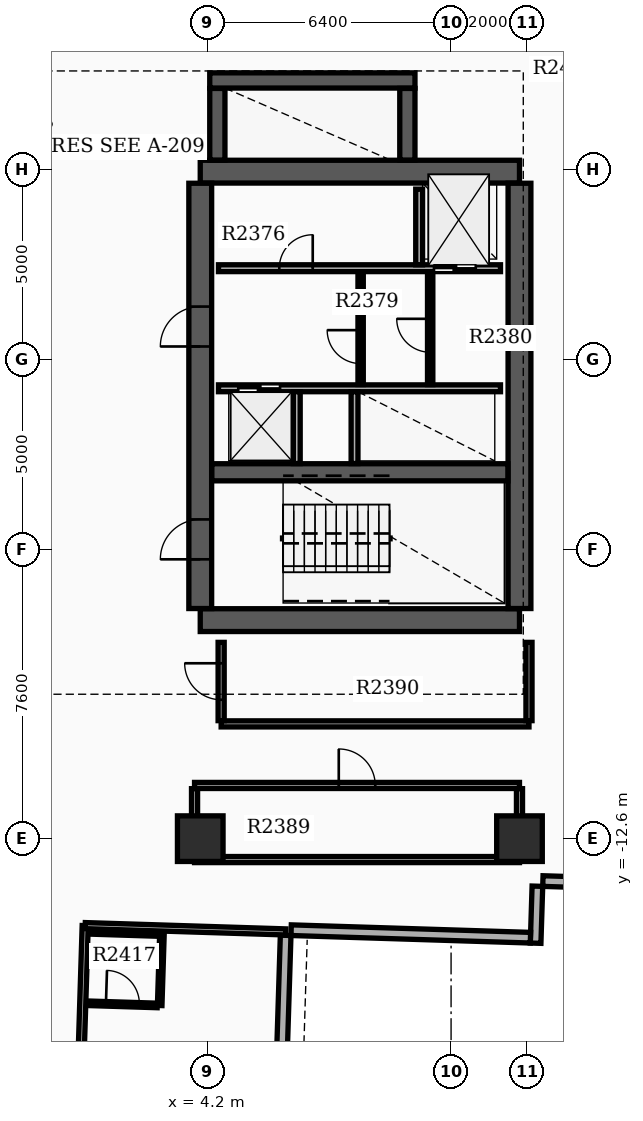
"""IFC4 building model, lengths in metres.
Left out: names, types, materials, properties, quantities, classifications, styles, units other than length and angle.
Written with IfcOpenShell. Run it as: python <this file> out.ifc"""

import sys

from ifc_helpers import new_model, si_unit, direction, frame, frame_2d, origin, origin_2d, place, context, subcontext, project, spatial, rectangle, extrude, element, fill, save


model = new_model("IFC4")
c1 = context("Model", 3, precision=1e-05, world=origin(), true_north=direction((0.0, 1.0)))
c2 = subcontext(c1, "Body", "Model", "MODEL_VIEW")
j1 = project(units=[si_unit("LENGTHUNIT", "METRE"), si_unit("PLANEANGLEUNIT", "RADIAN")], contexts=[c1])
p1 = place(None, origin())
s1 = spatial("IfcSite", under=j1, at=p1, CompositionType="ELEMENT")
p2 = place(p1, origin())
s2 = spatial("IfcBuilding", under=s1, at=p2, CompositionType="ELEMENT")
p3 = place(p2, frame((0.0, 0.0, 152.7)))
s3 = spatial("IfcBuildingStorey", under=s2, at=p3, CompositionType="ELEMENT", Elevation=152.7)
for number, where, z_axis, x_axis in (
    (1, (4.0, -6.85, 0.0), (0.0, 0.0, 1.0), (1.0, 0.0, 0.0)),
    (2, (4.0, 4.95, 0.0), (0.0, 0.0, 1.0), (1.0, 0.0, 0.0)),
):
    element("IfcWall", number, at=place(p3, frame(where, z_axis=z_axis, x_axis=x_axis)), inside=s3, PredefinedType="SHEAR", context=c2, shape_type="SweptSolid", body=[
        extrude(rectangle(XDim=8.4, YDim=0.6, at=frame_2d((4.2, 0.0))), origin(), (0.0, 0.0, 1.0), 3.7),
    ])
p4 = place(p3, frame((4.0, -6.545, 0.0), z_axis=(0.0, 0.0, 1.0), x_axis=(0.0, 1.0, 0.0)))
e3 = element("IfcWall", 3, at=p4, inside=s3, PredefinedType="SHEAR", context=c2, shape_type="SweptSolid", body=[
    extrude(rectangle(XDim=11.19, YDim=0.6, at=frame_2d((5.595, 0.0))), origin(), (0.0, 0.0, 1.0), 3.7),
])
p5 = place(p4, frame((1.295, 0.0, 0.0)))
e4 = element("IfcOpeningElement", 4, at=p5, cuts=e3, PredefinedType="OPENING", context=c2, shape_type="SweptSolid", body=[
    extrude(rectangle(XDim=1.05, YDim=2.15, at=frame_2d((0.525, 1.075))), frame((0.0, 0.31, 0.0), z_axis=(0.0, -1.0, 0.0), x_axis=(1.0, 0.0, 0.0)), (0.0, 0.0, 1.0), 0.62),
])
p6 = place(p4, frame((6.895, 0.0, 0.0)))
e5 = element("IfcOpeningElement", 5, at=p6, cuts=e3, PredefinedType="OPENING", context=c2, shape_type="SweptSolid", body=[
    extrude(rectangle(XDim=1.05, YDim=2.15, at=frame_2d((0.525, 1.075))), frame((0.0, 0.31, 0.0), z_axis=(0.0, -1.0, 0.0), x_axis=(1.0, 0.0, 0.0)), (0.0, 0.0, 1.0), 0.62),
])
p7 = place(p3, frame((12.4, -6.545, 0.0), z_axis=(0.0, 0.0, 1.0), x_axis=(0.0, 1.0, 0.0)))
e6 = element("IfcWall", 6, at=p7, inside=s3, PredefinedType="SHEAR", context=c2, shape_type="SweptSolid", body=[
    extrude(rectangle(XDim=11.19, YDim=0.6, at=frame_2d((5.595, 0.0))), origin(), (0.0, 0.0, 1.0), 3.7),
])
p8 = place(p3, frame((4.305, -2.96, 0.0), z_axis=(0.0, 0.0, 1.0), x_axis=(1.0, 0.0, 0.0)))
e7 = element("IfcWall", 7, at=p8, inside=s3, PredefinedType="SHEAR", context=c2, shape_type="SweptSolid", body=[
    extrude(rectangle(XDim=7.79, YDim=0.45, at=frame_2d((3.895, 0.0))), origin(), (0.0, 0.0, 1.0), 3.7),
])
p9 = place(p3, frame((4.45, 5.255, 0.0), z_axis=(0.0, 0.0, 1.0), x_axis=(0.0, 1.0, 0.0)))
e8 = element("IfcWall", 8, at=p9, inside=s3, PredefinedType="SHEAR", context=c2, shape_type="SweptSolid", body=[
    extrude(rectangle(XDim=1.885, YDim=0.4, at=frame_2d((0.942, 0.0))), origin(), (0.0, 0.0, 1.0), 3.7),
])
p10 = place(p3, frame((4.25, 7.35, 0.0), z_axis=(0.0, 0.0, 1.0), x_axis=(1.0, 0.0, 0.0)))
e9 = element("IfcWall", 9, at=p10, inside=s3, PredefinedType="SHEAR", context=c2, shape_type="SweptSolid", body=[
    extrude(rectangle(XDim=5.4, YDim=0.4, at=frame_2d((2.7, 0.0))), origin(), (0.0, 0.0, 1.0), 3.7),
])
p11 = place(p3, frame((9.45, 5.255, 0.0), z_axis=(0.0, 0.0, 1.0), x_axis=(0.0, 1.0, 0.0)))
e10 = element("IfcWall", 10, at=p11, inside=s3, PredefinedType="SHEAR", context=c2, shape_type="SweptSolid", body=[
    extrude(rectangle(XDim=1.885, YDim=0.4, at=frame_2d((0.942, 0.0))), origin(), (0.0, 0.0, 1.0), 3.7),
])
for number, where, z_axis, x_axis in (
    (11, (12.4, -12.6, 0.0), (0.0, 0.0, 1.0), (1.0, 0.0, 0.0)),
    (12, (4.0, -12.6, 0.0), (0.0, 0.0, 1.0), (1.0, 0.0, 0.0)),
):
    element("IfcColumn", number, at=place(p3, frame(where, z_axis=z_axis, x_axis=x_axis)), inside=s3, PredefinedType="COLUMN", context=c2, shape_type="SweptSolid", body=[
        extrude(rectangle(XDim=1.2, YDim=1.2, at=origin_2d()), origin(), (0.0, 0.0, 1.0), 3.9),
    ])
p12 = place(p3, frame((5.616, -35.234, 0.0), z_axis=(0.0, 0.0, 1.0), x_axis=(0.031398187845, 0.999506955354, 0.0)))
e13 = element("IfcWall", 13, at=p12, inside=s3, PredefinedType="STANDARD", context=c2, shape_type="SweptSolid", body=[
    extrude(rectangle(XDim=20.1, YDim=0.28, at=frame_2d((10.05, 0.0))), origin(), (0.0, 0.0, 1.0), 2.97),
])
p13 = place(p12, frame((0.85, 0.0, 0.8)))
e14 = element("IfcOpeningElement", 14, at=p13, cuts=e13, PredefinedType="OPENING", context=c2, shape_type="SweptSolid", body=[
    extrude(rectangle(XDim=1.4, YDim=1.6, at=frame_2d((0.7, 0.8))), frame((0.0, 0.15, 0.0), z_axis=(0.0, -1.0, 0.0), x_axis=(1.0, 0.0, 0.0)), (0.0, 0.0, 1.0), 0.3),
])
p14 = place(p12, frame((4.05, 0.0, 0.8)))
e15 = element("IfcOpeningElement", 15, at=p14, cuts=e13, PredefinedType="OPENING", context=c2, shape_type="SweptSolid", body=[
    extrude(rectangle(XDim=1.4, YDim=1.6, at=frame_2d((0.7, 0.8))), frame((0.0, 0.15, 0.0), z_axis=(0.0, -1.0, 0.0), x_axis=(1.0, 0.0, 0.0)), (0.0, 0.0, 1.0), 0.3),
])
p15 = place(p12, frame((7.25, 0.0, 0.8)))
e16 = element("IfcOpeningElement", 16, at=p15, cuts=e13, PredefinedType="OPENING", context=c2, shape_type="SweptSolid", body=[
    extrude(rectangle(XDim=1.4, YDim=1.6, at=frame_2d((0.7, 0.8))), frame((0.0, 0.15, 0.0), z_axis=(0.0, -1.0, 0.0), x_axis=(1.0, 0.0, 0.0)), (0.0, 0.0, 1.0), 0.3),
])
p16 = place(p12, frame((10.45, 0.0, 0.8)))
e17 = element("IfcOpeningElement", 17, at=p16, cuts=e13, PredefinedType="OPENING", context=c2, shape_type="SweptSolid", body=[
    extrude(rectangle(XDim=1.4, YDim=1.6, at=frame_2d((0.7, 0.8))), frame((0.0, 0.15, 0.0), z_axis=(0.0, -1.0, 0.0), x_axis=(1.0, 0.0, 0.0)), (0.0, 0.0, 1.0), 0.3),
])
p17 = place(p3, frame((14.235, -13.754, 0.0), z_axis=(0.0, 0.0, 1.0), x_axis=(-0.999506398264, 0.031415916822, 0.0)))
e18 = element("IfcWall", 18, at=p17, inside=s3, PredefinedType="STANDARD", context=c2, shape_type="SweptSolid", body=[
    extrude(rectangle(XDim=1.22, YDim=0.28, at=frame_2d((0.61, 0.0))), origin(), (0.0, 0.0, 1.0), 2.97),
])
p18 = place(p3, frame((12.871, -13.851, 0.0), z_axis=(0.0, 0.0, 1.0), x_axis=(-0.031412596484, -0.999506502621, 0.0)))
e19 = element("IfcWall", 19, at=p18, inside=s3, PredefinedType="STANDARD", context=c2, shape_type="SweptSolid", body=[
    extrude(rectangle(XDim=1.5, YDim=0.28, at=frame_2d((0.75, 0.0))), origin(), (0.0, 0.0, 1.0), 2.97),
])
p19 = place(p3, frame((12.689, -15.206, 0.0), z_axis=(0.0, 0.0, 1.0), x_axis=(-0.999507262922, 0.031388395416, 0.0)))
e20 = element("IfcWall", 20, at=p19, inside=s3, PredefinedType="STANDARD", context=c2, shape_type="SweptSolid", body=[
    extrude(rectangle(XDim=6.3, YDim=0.28, at=frame_2d((3.15, 0.0))), origin(), (0.0, 0.0, 1.0), 2.97),
])
p20 = place(p3, frame((4.48, 2.41, 0.0), z_axis=(0.0, 0.0, 1.0), x_axis=(1.0, 0.0, 0.0)))
e21 = element("IfcWall", 21, at=p20, inside=s3, PredefinedType="SOLIDWALL", context=c2, shape_type="SweptSolid", body=[
    extrude(rectangle(XDim=7.42, YDim=0.18, at=frame_2d((3.71, 0.0))), origin(), (0.0, 0.0, 1.0), 2.96),
])
p21 = place(p20, frame((5.67, 0.0, 0.0)))
e22 = element("IfcOpeningElement", 22, at=p21, cuts=e21, PredefinedType="OPENING", context=c2, shape_type="SweptSolid", body=[
    extrude(rectangle(XDim=1.1, YDim=2.15, at=frame_2d((0.55, 1.075))), frame((0.0, 0.1, 0.0), z_axis=(0.0, -1.0, 0.0), x_axis=(1.0, 0.0, 0.0)), (0.0, 0.0, 1.0), 0.2),
])
p22 = place(p20, frame((1.6, 0.0, 0.0)))
e23 = element("IfcOpeningElement", 23, at=p22, cuts=e21, PredefinedType="OPENING", context=c2, shape_type="SweptSolid", body=[
    extrude(rectangle(XDim=0.88, YDim=2.1, at=frame_2d((0.44, 1.05))), frame((0.0, 0.1, 0.0), z_axis=(0.0, -1.0, 0.0), x_axis=(1.0, 0.0, 0.0)), (0.0, 0.0, 1.0), 0.2),
])
p23 = place(p3, frame((4.48, -0.75, 0.0), z_axis=(0.0, 0.0, 1.0), x_axis=(1.0, 0.0, 0.0)))
e24 = element("IfcWall", 24, at=p23, inside=s3, PredefinedType="SOLIDWALL", context=c2, shape_type="SweptSolid", body=[
    extrude(rectangle(XDim=7.42, YDim=0.18, at=frame_2d((3.71, 0.0))), origin(), (0.0, 0.0, 1.0), 2.96),
])
p24 = place(p23, frame((0.52, 0.0, 0.0)))
e25 = element("IfcOpeningElement", 25, at=p24, cuts=e24, PredefinedType="OPENING", context=c2, shape_type="SweptSolid", body=[
    extrude(rectangle(XDim=1.1, YDim=2.15, at=frame_2d((0.55, 1.075))), frame((0.0, 0.1, 0.0), z_axis=(0.0, -1.0, 0.0), x_axis=(1.0, 0.0, 0.0)), (0.0, 0.0, 1.0), 0.2),
])
p25 = place(p3, frame((9.76, 2.5, 0.0), z_axis=(0.0, 0.0, 1.0), x_axis=(0.0, 1.0, 0.0)))
e26 = element("IfcWall", 26, at=p25, inside=s3, PredefinedType="SOLIDWALL", context=c2, shape_type="SweptSolid", body=[
    extrude(rectangle(XDim=1.99, YDim=0.18, at=frame_2d((0.995, 0.0))), origin(), (0.0, 0.0, 1.0), 2.96),
])
for number, where, z_axis, x_axis in (
    (27, (6.54, -2.73, 0.0), (0.0, 0.0, 1.0), (0.0, 1.0, 0.0)),
    (28, (8.06, -2.73, 0.0), (0.0, 0.0, 1.0), (0.0, 1.0, 0.0)),
):
    element("IfcWall", number, at=place(p3, frame(where, z_axis=z_axis, x_axis=x_axis)), inside=s3, PredefinedType="SOLIDWALL", context=c2, shape_type="SweptSolid", body=[
        extrude(rectangle(XDim=1.89, YDim=0.18, at=frame_2d((0.945, 0.0))), origin(), (0.0, 0.0, 1.0), 2.96),
    ])
p26 = place(p3, frame((8.22, -0.65, 0.0), z_axis=(0.0, 0.0, 1.0), x_axis=(0.0, 1.0, 0.0)))
e29 = element("IfcWall", 29, at=p26, inside=s3, PredefinedType="SOLIDWALL", context=c2, shape_type="SweptSolid", body=[
    extrude(rectangle(XDim=2.96, YDim=0.14, at=frame_2d((1.48, 0.0))), origin(), (0.0, 0.0, 1.0), 2.96),
])
p27 = place(p26, frame((0.55, 0.0, 0.0)))
e30 = element("IfcOpeningElement", 30, at=p27, cuts=e29, PredefinedType="OPENING", context=c2, shape_type="SweptSolid", body=[
    extrude(rectangle(XDim=0.88, YDim=2.1, at=frame_2d((0.44, 1.05))), frame((0.0, 0.08, 0.0), z_axis=(0.0, -1.0, 0.0), x_axis=(1.0, 0.0, 0.0)), (0.0, 0.0, 1.0), 0.16),
])
p28 = place(p3, frame((10.05, -0.652, 0.0), z_axis=(0.0, 0.0, 1.0), x_axis=(0.0, 1.0, 0.0)))
e31 = element("IfcWall", 31, at=p28, inside=s3, PredefinedType="PARTITIONING", context=c2, shape_type="SweptSolid", body=[
    extrude(rectangle(XDim=2.962, YDim=0.14, at=frame_2d((1.481, 0.0))), origin(), (0.0, 0.0, 1.0), 2.96),
])
p29 = place(p28, frame((0.85, 0.0, 0.0)))
e32 = element("IfcOpeningElement", 32, at=p29, cuts=e31, PredefinedType="OPENING", context=c2, shape_type="SweptSolid", body=[
    extrude(rectangle(XDim=0.88, YDim=2.1, at=frame_2d((0.44, 1.05))), frame((0.0, 0.08, 0.0), z_axis=(0.0, -1.0, 0.0), x_axis=(1.0, 0.0, 0.0)), (0.0, 0.0, 1.0), 0.16),
])
p30 = place(p3, frame((3.85, -13.15, 0.0), z_axis=(0.0, 0.0, 1.0), x_axis=(1.0, 0.0, 0.0)))
e33 = element("IfcWall", 33, at=p30, inside=s3, PredefinedType="PARTITIONING", context=c2, shape_type="SweptSolid", body=[
    extrude(rectangle(XDim=8.55, YDim=0.16, at=frame_2d((4.275, 0.0))), origin(), (0.0, 0.0, 1.0), 2.96),
])
p31 = place(p3, frame((3.85, -11.2, 0.0), z_axis=(0.0, 0.0, 1.0), x_axis=(1.0, 0.0, 0.0)))
e34 = element("IfcWall", 34, at=p31, inside=s3, PredefinedType="PARTITIONING", context=c2, shape_type="SweptSolid", body=[
    extrude(rectangle(XDim=8.55, YDim=0.16, at=frame_2d((4.275, 0.0))), origin(), (0.0, 0.0, 1.0), 2.96),
])
p32 = place(p31, frame((3.795, 0.0, 0.0)))
e35 = element("IfcOpeningElement", 35, at=p32, cuts=e34, PredefinedType="OPENING", context=c2, shape_type="SweptSolid", body=[
    extrude(rectangle(XDim=0.96, YDim=2.15, at=frame_2d((0.48, 1.075))), frame((0.0, 0.09, 0.0), z_axis=(0.0, -1.0, 0.0), x_axis=(1.0, 0.0, 0.0)), (0.0, 0.0, 1.0), 0.18),
])
for number, where, z_axis, x_axis in (
    (36, (3.85, -13.065, 0.0), (0.0, 0.0, 1.0), (0.0, 1.0, 0.0)),
    (37, (12.4, -13.065, 0.0), (0.0, 0.0, 1.0), (0.0, 1.0, 0.0)),
):
    element("IfcWall", number, at=place(p3, frame(where, z_axis=z_axis, x_axis=x_axis)), inside=s3, PredefinedType="PARTITIONING", context=c2, shape_type="SweptSolid", body=[
        extrude(rectangle(XDim=1.78, YDim=0.16, at=frame_2d((0.89, 0.0))), origin(), (0.0, 0.0, 1.0), 2.96),
    ])
p33 = place(p3, frame((4.55, -9.58, 0.0), z_axis=(0.0, 0.0, 1.0), x_axis=(1.0, 0.0, 0.0)))
e38 = element("IfcWall", 38, at=p33, inside=s3, PredefinedType="PARTITIONING", context=c2, shape_type="SweptSolid", body=[
    extrude(rectangle(XDim=8.1, YDim=0.16, at=frame_2d((4.05, 0.0))), origin(), (0.0, 0.0, 1.0), 2.96),
])
p34 = place(p3, frame((4.55, -9.495, 0.0), z_axis=(0.0, 0.0, 1.0), x_axis=(0.0, 1.0, 0.0)))
e39 = element("IfcWall", 39, at=p34, inside=s3, PredefinedType="PARTITIONING", context=c2, shape_type="SweptSolid", body=[
    extrude(rectangle(XDim=2.06, YDim=0.16, at=frame_2d((1.03, 0.0))), origin(), (0.0, 0.0, 1.0), 2.96),
])
p35 = place(p34, frame((0.55, 0.0, 0.0)))
e40 = element("IfcOpeningElement", 40, at=p35, cuts=e39, PredefinedType="OPENING", context=c2, shape_type="SweptSolid", body=[
    extrude(rectangle(XDim=0.96, YDim=2.15, at=frame_2d((0.48, 1.075))), frame((0.0, 0.09, 0.0), z_axis=(0.0, -1.0, 0.0), x_axis=(1.0, 0.0, 0.0)), (0.0, 0.0, 1.0), 0.18),
])
p36 = place(p3, frame((12.65, -9.495, 0.0), z_axis=(0.0, 0.0, 1.0), x_axis=(0.0, 1.0, 0.0)))
e41 = element("IfcWall", 41, at=p36, inside=s3, PredefinedType="PARTITIONING", context=c2, shape_type="SweptSolid", body=[
    extrude(rectangle(XDim=2.06, YDim=0.16, at=frame_2d((1.03, 0.0))), origin(), (0.0, 0.0, 1.0), 2.96),
])
p37 = place(p3, frame((0.973, -14.888, 0.0), z_axis=(0.0, 0.0, 1.0), x_axis=(-0.031416030536, -0.99950639469, 0.0)))
e42 = element("IfcWall", 42, at=p37, inside=s3, PredefinedType="PARTITIONING", context=c2, shape_type="SweptSolid", body=[
    extrude(rectangle(XDim=20.182, YDim=0.16, at=frame_2d((10.091, 0.0))), origin(), (0.0, 0.0, 1.0), 2.96),
])
p38 = place(p37, frame((18.93, 0.0, 0.0)))
e43 = element("IfcOpeningElement", 43, at=p38, cuts=e42, PredefinedType="OPENING", context=c2, shape_type="SweptSolid", body=[
    extrude(rectangle(XDim=0.96, YDim=2.15, at=frame_2d((0.48, 1.075))), frame((0.0, 0.09, 0.0), z_axis=(0.0, -1.0, 0.0), x_axis=(1.0, 0.0, 0.0)), (0.0, 0.0, 1.0), 0.18),
])
p39 = place(p3, frame((0.973, -14.888, 0.0), z_axis=(0.0, 0.0, 1.0), x_axis=(0.99950701053, -0.031396431354, 0.0)))
e44 = element("IfcWall", 44, at=p39, inside=s3, PredefinedType="PARTITIONING", context=c2, shape_type="SweptSolid", body=[
    extrude(rectangle(XDim=5.28, YDim=0.16, at=frame_2d((2.64, 0.0))), origin(), (0.0, 0.0, 1.0), 2.96),
])
p40 = place(p3, frame((1.049, -16.931, 0.0), z_axis=(0.0, 0.0, 1.0), x_axis=(0.999507353951, -0.031385496622, 0.0)))
e45 = element("IfcWall", 45, at=p40, inside=s3, PredefinedType="PARTITIONING", context=c2, shape_type="SweptSolid", body=[
    extrude(rectangle(XDim=1.82, YDim=0.12, at=frame_2d((0.91, 0.0))), origin(), (0.0, 0.0, 1.0), 2.96),
])
p41 = place(p40, frame((0.47, 0.0, 0.0)))
e46 = element("IfcOpeningElement", 46, at=p41, cuts=e45, PredefinedType="OPENING", context=c2, shape_type="SweptSolid", body=[
    extrude(rectangle(XDim=0.88, YDim=2.1, at=frame_2d((0.44, 1.05))), frame((0.0, 0.07, 0.0), z_axis=(0.0, -1.0, 0.0), x_axis=(1.0, 0.0, 0.0)), (0.0, 0.0, 1.0), 0.14),
])
p42 = place(p3, frame((1.108, -15.052, 0.0), z_axis=(0.0, 0.0, 1.0), x_axis=(0.999507221803, -0.031389704724, 0.0)))
e47 = element("IfcWall", 47, at=p42, inside=s3, PredefinedType="PARTITIONING", context=c2, shape_type="SweptSolid", body=[
    extrude(rectangle(XDim=1.82, YDim=0.12, at=frame_2d((0.91, 0.0))), origin(), (0.0, 0.0, 1.0), 2.96),
])
p43 = place(p3, frame((2.992, -15.111, 0.0), z_axis=(0.0, 0.0, 1.0), x_axis=(-0.031295563454, -0.999510173889, 0.0)))
e48 = element("IfcWall", 48, at=p43, inside=s3, PredefinedType="PARTITIONING", context=c2, shape_type="SweptSolid", body=[
    extrude(rectangle(XDim=1.88, YDim=0.12, at=frame_2d((0.94, 0.0))), origin(), (0.0, 0.0, 1.0), 2.96),
])
p44 = place(p5, origin())
e49 = element("IfcDoor", 49, at=p44, inside=s3, OperationType="SINGLE_SWING_LEFT", PredefinedType="DOOR", context=c2, shape_type="SweptSolid", body=[
    extrude(rectangle(XDim=1.05, YDim=2.15, at=frame_2d((0.525, 1.075))), frame((0.0, 0.025, 0.0), z_axis=(0.0, -1.0, 0.0), x_axis=(1.0, 0.0, 0.0)), (0.0, 0.0, 1.0), 0.05),
])
fill(e4, e49)
p45 = place(p6, origin())
e50 = element("IfcDoor", 50, at=p45, inside=s3, OperationType="SINGLE_SWING_LEFT", PredefinedType="DOOR", context=c2, shape_type="SweptSolid", body=[
    extrude(rectangle(XDim=1.05, YDim=2.15, at=frame_2d((0.525, 1.075))), frame((0.0, 0.025, 0.0), z_axis=(0.0, -1.0, 0.0), x_axis=(1.0, 0.0, 0.0)), (0.0, 0.0, 1.0), 0.05),
])
fill(e5, e50)
p46 = place(p21, origin())
e51 = element("IfcDoor", 51, at=p46, inside=s3, OperationType="DOUBLE_DOOR_SLIDING", PredefinedType="DOOR", context=c2, shape_type="SweptSolid", body=[
    extrude(rectangle(XDim=1.1, YDim=2.15, at=frame_2d((0.55, 1.075))), frame((0.0, 0.025, 0.0), z_axis=(0.0, -1.0, 0.0), x_axis=(1.0, 0.0, 0.0)), (0.0, 0.0, 1.0), 0.05),
])
fill(e22, e51)
p47 = place(p24, origin())
e52 = element("IfcDoor", 52, at=p47, inside=s3, OperationType="DOUBLE_DOOR_SLIDING", PredefinedType="DOOR", context=c2, shape_type="SweptSolid", body=[
    extrude(rectangle(XDim=1.1, YDim=2.15, at=frame_2d((0.55, 1.075))), frame((0.0, 0.025, 0.0), z_axis=(0.0, -1.0, 0.0), x_axis=(1.0, 0.0, 0.0)), (0.0, 0.0, 1.0), 0.05),
])
fill(e25, e52)
p48 = place(p22, origin())
e53 = element("IfcDoor", 53, at=p48, inside=s3, OperationType="SINGLE_SWING_RIGHT", PredefinedType="DOOR", context=c2, shape_type="SweptSolid", body=[
    extrude(rectangle(XDim=0.88, YDim=2.1, at=frame_2d((0.44, 1.05))), frame((0.0, 0.025, 0.0), z_axis=(0.0, -1.0, 0.0), x_axis=(1.0, 0.0, 0.0)), (0.0, 0.0, 1.0), 0.05),
])
fill(e23, e53)
p49 = place(p27, origin())
e54 = element("IfcDoor", 54, at=p49, inside=s3, OperationType="SINGLE_SWING_RIGHT", PredefinedType="DOOR", context=c2, shape_type="SweptSolid", body=[
    extrude(rectangle(XDim=0.88, YDim=2.1, at=frame_2d((0.44, 1.05))), frame((0.0, 0.025, 0.0), z_axis=(0.0, -1.0, 0.0), x_axis=(1.0, 0.0, 0.0)), (0.0, 0.0, 1.0), 0.05),
])
fill(e30, e54)
p50 = place(p29, origin())
e55 = element("IfcDoor", 55, at=p50, inside=s3, OperationType="SINGLE_SWING_RIGHT", PredefinedType="DOOR", context=c2, shape_type="SweptSolid", body=[
    extrude(rectangle(XDim=0.88, YDim=2.1, at=frame_2d((0.44, 1.05))), frame((0.0, 0.025, 0.0), z_axis=(0.0, -1.0, 0.0), x_axis=(1.0, 0.0, 0.0)), (0.0, 0.0, 1.0), 0.05),
])
fill(e32, e55)
p51 = place(p32, origin())
e56 = element("IfcDoor", 56, at=p51, inside=s3, OperationType="SINGLE_SWING_LEFT", PredefinedType="DOOR", context=c2, shape_type="SweptSolid", body=[
    extrude(rectangle(XDim=0.96, YDim=2.15, at=frame_2d((0.48, 1.075))), frame((0.0, 0.025, 0.0), z_axis=(0.0, -1.0, 0.0), x_axis=(1.0, 0.0, 0.0)), (0.0, 0.0, 1.0), 0.05),
])
fill(e35, e56)
p52 = place(p35, origin())
e57 = element("IfcDoor", 57, at=p52, inside=s3, OperationType="SINGLE_SWING_RIGHT", PredefinedType="DOOR", context=c2, shape_type="SweptSolid", body=[
    extrude(rectangle(XDim=0.96, YDim=2.15, at=frame_2d((0.48, 1.075))), frame((0.0, 0.025, 0.0), z_axis=(0.0, -1.0, 0.0), x_axis=(1.0, 0.0, 0.0)), (0.0, 0.0, 1.0), 0.05),
])
fill(e40, e57)
p53 = place(p41, origin())
e58 = element("IfcDoor", 58, at=p53, inside=s3, OperationType="SINGLE_SWING_LEFT", PredefinedType="DOOR", context=c2, shape_type="SweptSolid", body=[
    extrude(rectangle(XDim=0.88, YDim=2.1, at=frame_2d((0.44, 1.05))), frame((0.0, 0.025, 0.0), z_axis=(0.0, -1.0, 0.0), x_axis=(1.0, 0.0, 0.0)), (0.0, 0.0, 1.0), 0.05),
])
fill(e46, e58)
save(model, sys.argv[1])
